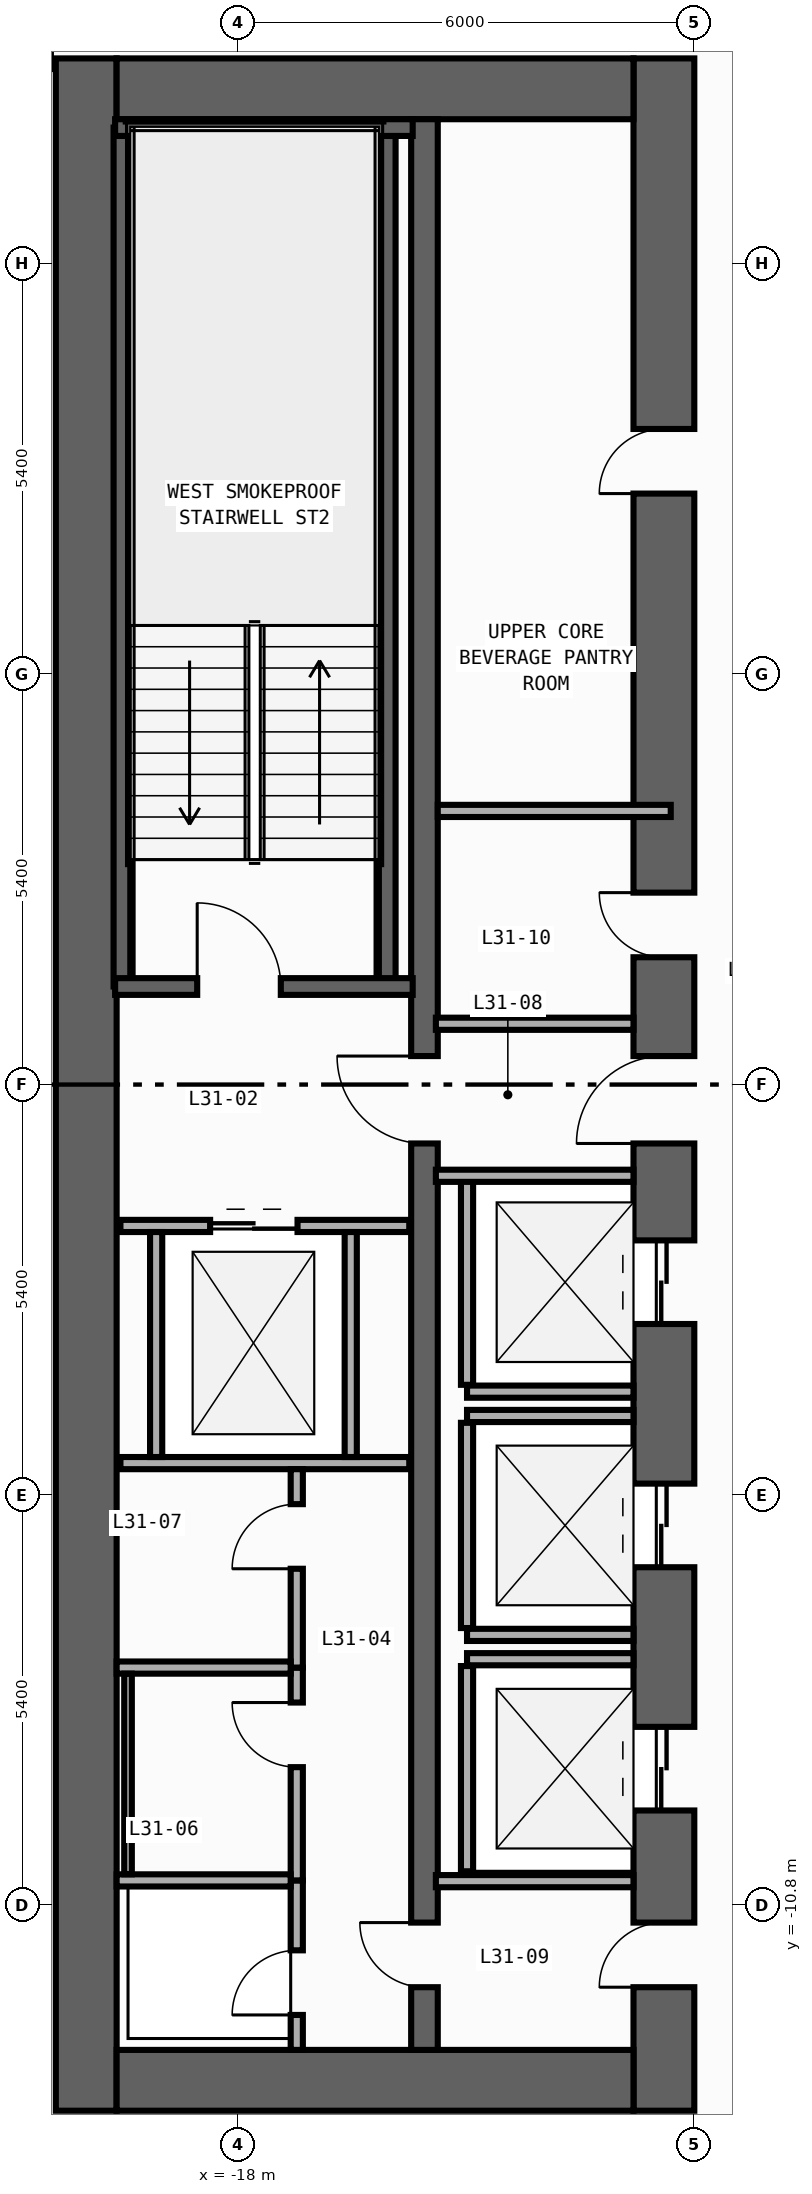
"""IFC4 building model, lengths in metres.
Left out: names, types, materials, properties, quantities, classifications, styles, units other than length and angle.
Written with IfcOpenShell. Run it as: python <this file> out.ifc"""

import sys

from ifc_helpers import new_model, si_unit, direction, frame, frame_2d, origin, place, context, subcontext, project, spatial, rectangle, extrude, element, fill, save


model = new_model("IFC4")
c1 = context("Model", 3, precision=1e-05, world=origin(), true_north=direction((0.0, 1.0)))
c2 = subcontext(c1, "Body", "Model", "MODEL_VIEW")
j1 = project(units=[si_unit("LENGTHUNIT", "METRE"), si_unit("PLANEANGLEUNIT", "RADIAN")], contexts=[c1])
p1 = place(None, origin())
s1 = spatial("IfcSite", under=j1, at=p1, CompositionType="ELEMENT")
p2 = place(p1, origin())
s2 = spatial("IfcBuilding", under=s1, at=p2, CompositionType="ELEMENT")
p3 = place(p2, frame((0.0, 0.0, 135.2)))
s3 = spatial("IfcBuildingStorey", under=s2, at=p3, CompositionType="ELEMENT", Elevation=135.2)
p4 = place(p3, frame((-20.0, -13.5, 0.0), z_axis=(0.0, 0.0, 1.0), x_axis=(0.0, 1.0, 0.0)))
e1 = element("IfcWall", 1, at=p4, inside=s3, PredefinedType="SHEAR", context=c2, shape_type="SweptSolid", body=[
    extrude(rectangle(XDim=27.0, YDim=0.8, at=frame_2d((13.5, 0.0))), origin(), (0.0, 0.0, 1.0), 3.94),
])
p5 = place(p3, frame((-12.4, -13.5, 0.0), z_axis=(0.0, 0.0, 1.0), x_axis=(0.0, 1.0, 0.0)))
e2 = element("IfcWall", 2, at=p5, inside=s3, PredefinedType="SHEAR", context=c2, shape_type="SweptSolid", body=[
    extrude(rectangle(XDim=27.0, YDim=0.8, at=frame_2d((13.5, 0.0))), origin(), (0.0, 0.0, 1.0), 3.94),
])
p6 = place(p5, frame((10.35, 0.0, 0.0)))
e3 = element("IfcOpeningElement", 3, at=p6, cuts=e2, PredefinedType="OPENING", context=c2, shape_type="SweptSolid", body=[
    extrude(rectangle(XDim=1.1, YDim=2.2, at=frame_2d((0.55, 1.1))), frame((0.0, 0.41, 0.0), z_axis=(0.0, -1.0, 0.0), x_axis=(1.0, 0.0, 0.0)), (0.0, 0.0, 1.0), 0.82),
])
p7 = place(p5, frame((7.15, 0.0, 0.0)))
e4 = element("IfcOpeningElement", 4, at=p7, cuts=e2, PredefinedType="OPENING", context=c2, shape_type="SweptSolid", body=[
    extrude(rectangle(XDim=1.1, YDim=2.2, at=frame_2d((0.55, 1.1))), frame((0.0, 0.41, 0.0), z_axis=(0.0, -1.0, 0.0), x_axis=(1.0, 0.0, 0.0)), (0.0, 0.0, 1.0), 0.82),
])
p8 = place(p5, frame((3.95, 0.0, 0.0)))
e5 = element("IfcOpeningElement", 5, at=p8, cuts=e2, PredefinedType="OPENING", context=c2, shape_type="SweptSolid", body=[
    extrude(rectangle(XDim=1.1, YDim=2.2, at=frame_2d((0.55, 1.1))), frame((0.0, 0.41, 0.0), z_axis=(0.0, -1.0, 0.0), x_axis=(1.0, 0.0, 0.0)), (0.0, 0.0, 1.0), 0.82),
])
p9 = place(p5, frame((15.175, 0.0, 0.0)))
e6 = element("IfcOpeningElement", 6, at=p9, cuts=e2, PredefinedType="OPENING", context=c2, shape_type="SweptSolid", body=[
    extrude(rectangle(XDim=0.85, YDim=2.1, at=frame_2d((0.425, 1.05))), frame((0.0, 0.41, 0.0), z_axis=(0.0, -1.0, 0.0), x_axis=(1.0, 0.0, 0.0)), (0.0, 0.0, 1.0), 0.82),
])
p10 = place(p5, frame((21.275, 0.0, 0.0)))
e7 = element("IfcOpeningElement", 7, at=p10, cuts=e2, PredefinedType="OPENING", context=c2, shape_type="SweptSolid", body=[
    extrude(rectangle(XDim=0.85, YDim=2.1, at=frame_2d((0.425, 1.05))), frame((0.0, 0.41, 0.0), z_axis=(0.0, -1.0, 0.0), x_axis=(1.0, 0.0, 0.0)), (0.0, 0.0, 1.0), 0.82),
])
p11 = place(p5, frame((12.725, 0.0, 0.0)))
e8 = element("IfcOpeningElement", 8, at=p11, cuts=e2, PredefinedType="OPENING", context=c2, shape_type="SweptSolid", body=[
    extrude(rectangle(XDim=1.15, YDim=2.2, at=frame_2d((0.575, 1.1))), frame((0.0, 0.41, 0.0), z_axis=(0.0, -1.0, 0.0), x_axis=(1.0, 0.0, 0.0)), (0.0, 0.0, 1.0), 0.82),
])
p12 = place(p5, frame((1.625, 0.0, 0.0)))
e9 = element("IfcOpeningElement", 9, at=p12, cuts=e2, PredefinedType="OPENING", context=c2, shape_type="SweptSolid", body=[
    extrude(rectangle(XDim=0.85, YDim=2.1, at=frame_2d((0.425, 1.05))), frame((0.0, 0.41, 0.0), z_axis=(0.0, -1.0, 0.0), x_axis=(1.0, 0.0, 0.0)), (0.0, 0.0, 1.0), 0.82),
])
for number, where, z_axis, x_axis in (
    (10, (-19.6, -13.1, 0.0), (0.0, 0.0, 1.0), (1.0, 0.0, 0.0)),
    (11, (-19.6, 13.1, 0.0), (0.0, 0.0, 1.0), (1.0, 0.0, 0.0)),
):
    element("IfcWall", number, at=place(p3, frame(where, z_axis=z_axis, x_axis=x_axis)), inside=s3, PredefinedType="SHEAR", context=c2, shape_type="SweptSolid", body=[
        extrude(rectangle(XDim=6.8, YDim=0.8, at=frame_2d((3.4, 0.0))), origin(), (0.0, 0.0, 1.0), 3.94),
    ])
p13 = place(p3, frame((-15.55, -12.7, 0.0), z_axis=(0.0, 0.0, 1.0), x_axis=(0.0, 1.0, 0.0)))
e12 = element("IfcWall", 12, at=p13, inside=s3, PredefinedType="SHEAR", context=c2, shape_type="SweptSolid", body=[
    extrude(rectangle(XDim=25.4, YDim=0.35, at=frame_2d((12.7, 0.0))), origin(), (0.0, 0.0, 1.0), 3.94),
])
p14 = place(p13, frame((11.925, 0.0, 0.0)))
e13 = element("IfcOpeningElement", 13, at=p14, cuts=e12, PredefinedType="OPENING", context=c2, shape_type="SweptSolid", body=[
    extrude(rectangle(XDim=1.15, YDim=2.2, at=frame_2d((0.575, 1.1))), frame((0.0, 0.185, 0.0), z_axis=(0.0, -1.0, 0.0), x_axis=(1.0, 0.0, 0.0)), (0.0, 0.0, 1.0), 0.37),
])
p15 = place(p13, frame((0.825, 0.0, 0.0)))
e14 = element("IfcOpeningElement", 14, at=p15, cuts=e12, PredefinedType="OPENING", context=c2, shape_type="SweptSolid", body=[
    extrude(rectangle(XDim=0.85, YDim=2.1, at=frame_2d((0.425, 1.05))), frame((0.0, 0.185, 0.0), z_axis=(0.0, -1.0, 0.0), x_axis=(1.0, 0.0, 0.0)), (0.0, 0.0, 1.0), 0.37),
])
for number, where, z_axis, x_axis in (
    (15, (-16.04, 1.29, 0.0), (0.0, 0.0, 1.0), (0.0, 1.0, 0.0)),
    (16, (-19.53, 1.29, 0.0), (0.0, 0.0, 1.0), (0.0, 1.0, 0.0)),
):
    element("IfcWall", number, at=place(p3, frame(where, z_axis=z_axis, x_axis=x_axis)), inside=s3, PredefinedType="SHEAR", context=c2, shape_type="SweptSolid", body=[
        extrude(rectangle(XDim=11.3, YDim=0.22, at=frame_2d((5.65, 0.0))), origin(), (0.0, 0.0, 1.0), 3.94),
    ])
p16 = place(p3, frame((-19.62, 12.59, 0.0), z_axis=(0.0, 0.0, 1.0), x_axis=(1.0, 0.0, 0.0)))
e17 = element("IfcWall", 17, at=p16, inside=s3, PredefinedType="SHEAR", context=c2, shape_type="SweptSolid", body=[
    extrude(rectangle(XDim=3.915, YDim=0.22, at=frame_2d((1.958, 0.0))), origin(), (0.0, 0.0, 1.0), 3.94),
])
p17 = place(p3, frame((-19.62, 1.29, 0.0), z_axis=(0.0, 0.0, 1.0), x_axis=(1.0, 0.0, 0.0)))
e18 = element("IfcWall", 18, at=p17, inside=s3, PredefinedType="SHEAR", context=c2, shape_type="SweptSolid", body=[
    extrude(rectangle(XDim=3.915, YDim=0.22, at=frame_2d((1.958, 0.0))), origin(), (0.0, 0.0, 1.0), 3.94),
])
p18 = place(p17, frame((1.08, 0.0, 0.0)))
e19 = element("IfcOpeningElement", 19, at=p18, cuts=e18, PredefinedType="OPENING", context=c2, shape_type="SweptSolid", body=[
    extrude(rectangle(XDim=1.1, YDim=2.2, at=frame_2d((0.55, 1.1))), frame((0.0, 0.12, 0.0), z_axis=(0.0, -1.0, 0.0), x_axis=(1.0, 0.0, 0.0)), (0.0, 0.0, 1.0), 0.24),
])
p19 = place(p3, frame((-14.99, -4.04, 0.0), z_axis=(0.0, 0.0, 1.0), x_axis=(1.0, 0.0, 0.0)))
e20 = element("IfcWall", 20, at=p19, inside=s3, PredefinedType="STANDARD", context=c2, shape_type="SweptSolid", body=[
    extrude(rectangle(XDim=2.19, YDim=0.16, at=frame_2d((1.095, 0.0))), origin(), (0.0, 0.0, 1.0), 3.94),
])
p20 = place(p3, frame((-14.99, -3.95, 0.0), z_axis=(0.0, 0.0, 1.0), x_axis=(0.0, 1.0, 0.0)))
e21 = element("IfcWall", 21, at=p20, inside=s3, PredefinedType="STANDARD", context=c2, shape_type="SweptSolid", body=[
    extrude(rectangle(XDim=2.7, YDim=0.16, at=frame_2d((1.35, 0.0))), origin(), (0.0, 0.0, 1.0), 3.94),
])
for number, where, z_axis, x_axis in (
    (22, (-14.99, -7.24, 0.0), (0.0, 0.0, 1.0), (1.0, 0.0, 0.0)),
    (23, (-14.99, -4.36, 0.0), (0.0, 0.0, 1.0), (1.0, 0.0, 0.0)),
):
    element("IfcWall", number, at=place(p3, frame(where, z_axis=z_axis, x_axis=x_axis)), inside=s3, PredefinedType="STANDARD", context=c2, shape_type="SweptSolid", body=[
        extrude(rectangle(XDim=2.19, YDim=0.16, at=frame_2d((1.095, 0.0))), origin(), (0.0, 0.0, 1.0), 3.94),
    ])
p21 = place(p3, frame((-14.99, -7.15, 0.0), z_axis=(0.0, 0.0, 1.0), x_axis=(0.0, 1.0, 0.0)))
e24 = element("IfcWall", 24, at=p21, inside=s3, PredefinedType="STANDARD", context=c2, shape_type="SweptSolid", body=[
    extrude(rectangle(XDim=2.7, YDim=0.16, at=frame_2d((1.35, 0.0))), origin(), (0.0, 0.0, 1.0), 3.94),
])
p22 = place(p3, frame((-14.99, -7.56, 0.0), z_axis=(0.0, 0.0, 1.0), x_axis=(1.0, 0.0, 0.0)))
e25 = element("IfcWall", 25, at=p22, inside=s3, PredefinedType="STANDARD", context=c2, shape_type="SweptSolid", body=[
    extrude(rectangle(XDim=2.19, YDim=0.16, at=frame_2d((1.095, 0.0))), origin(), (0.0, 0.0, 1.0), 3.94),
])
p23 = place(p3, frame((-14.99, -10.35, 0.0), z_axis=(0.0, 0.0, 1.0), x_axis=(0.0, 1.0, 0.0)))
e26 = element("IfcWall", 26, at=p23, inside=s3, PredefinedType="STANDARD", context=c2, shape_type="SweptSolid", body=[
    extrude(rectangle(XDim=2.7, YDim=0.16, at=frame_2d((1.35, 0.0))), origin(), (0.0, 0.0, 1.0), 3.94),
])
p24 = place(p3, frame((-19.55, -1.86, 0.0), z_axis=(0.0, 0.0, 1.0), x_axis=(1.0, 0.0, 0.0)))
e27 = element("IfcWall", 27, at=p24, inside=s3, PredefinedType="STANDARD", context=c2, shape_type="SweptSolid", body=[
    extrude(rectangle(XDim=3.8, YDim=0.16, at=frame_2d((1.9, 0.0))), origin(), (0.0, 0.0, 1.0), 3.94),
])
p25 = place(p24, frame((1.18, 0.0, 0.0)))
e28 = element("IfcOpeningElement", 28, at=p25, cuts=e27, PredefinedType="OPENING", context=c2, shape_type="SweptSolid", body=[
    extrude(rectangle(XDim=1.15, YDim=2.2, at=frame_2d((0.575, 1.1))), frame((0.0, 0.09, 0.0), z_axis=(0.0, -1.0, 0.0), x_axis=(1.0, 0.0, 0.0)), (0.0, 0.0, 1.0), 0.18),
])
p26 = place(p3, frame((-19.55, -4.98, 0.0), z_axis=(0.0, 0.0, 1.0), x_axis=(1.0, 0.0, 0.0)))
e29 = element("IfcWall", 29, at=p26, inside=s3, PredefinedType="STANDARD", context=c2, shape_type="SweptSolid", body=[
    extrude(rectangle(XDim=3.8, YDim=0.16, at=frame_2d((1.9, 0.0))), origin(), (0.0, 0.0, 1.0), 3.94),
])
for number, where, z_axis, x_axis in (
    (30, (-19.08, -4.9, 0.0), (0.0, 0.0, 1.0), (0.0, 1.0, 0.0)),
    (31, (-16.52, -4.9, 0.0), (0.0, 0.0, 1.0), (0.0, 1.0, 0.0)),
):
    element("IfcWall", number, at=place(p3, frame(where, z_axis=z_axis, x_axis=x_axis)), inside=s3, PredefinedType="STANDARD", context=c2, shape_type="SweptSolid", body=[
        extrude(rectangle(XDim=2.96, YDim=0.16, at=frame_2d((1.48, 0.0))), origin(), (0.0, 0.0, 1.0), 3.94),
    ])
for number, where, z_axis, x_axis in (
    (32, (-15.4, 0.8, 0.0), (0.0, 0.0, 1.0), (1.0, 0.0, 0.0)),
    (33, (-15.4, -1.2, 0.0), (0.0, 0.0, 1.0), (1.0, 0.0, 0.0)),
    (34, (-15.4, -10.48, 0.0), (0.0, 0.0, 1.0), (1.0, 0.0, 0.0)),
):
    element("IfcWall", number, at=place(p3, frame(where, z_axis=z_axis, x_axis=x_axis)), inside=s3, PredefinedType="STANDARD", context=c2, shape_type="SweptSolid", body=[
        extrude(rectangle(XDim=2.6, YDim=0.16, at=frame_2d((1.3, 0.0))), origin(), (0.0, 0.0, 1.0), 3.94),
    ])
p27 = place(p3, frame((-17.23, -12.7, 0.0), z_axis=(0.0, 0.0, 1.0), x_axis=(0.0, 1.0, 0.0)))
e35 = element("IfcWall", 35, at=p27, inside=s3, PredefinedType="PARTITIONING", context=c2, shape_type="SweptSolid", body=[
    extrude(rectangle(XDim=2.23, YDim=0.16, at=frame_2d((1.115, 0.0))), origin(), (0.0, 0.0, 1.0), 3.94),
])
p28 = place(p27, frame((0.46, 0.0, 0.0)))
e36 = element("IfcOpeningElement", 36, at=p28, cuts=e35, PredefinedType="OPENING", context=c2, shape_type="SweptSolid", body=[
    extrude(rectangle(XDim=0.85, YDim=2.1, at=frame_2d((0.425, 1.05))), frame((0.0, 0.09, 0.0), z_axis=(0.0, -1.0, 0.0), x_axis=(1.0, 0.0, 0.0)), (0.0, 0.0, 1.0), 0.18),
])
p29 = place(p3, frame((-17.23, -10.47, 0.0), z_axis=(0.0, 0.0, 1.0), x_axis=(0.0, 1.0, 0.0)))
e37 = element("IfcWall", 37, at=p29, inside=s3, PredefinedType="PARTITIONING", context=c2, shape_type="SweptSolid", body=[
    extrude(rectangle(XDim=2.8, YDim=0.16, at=frame_2d((1.4, 0.0))), origin(), (0.0, 0.0, 1.0), 3.94),
])
p30 = place(p29, frame((1.49, 0.0, 0.0)))
e38 = element("IfcOpeningElement", 38, at=p30, cuts=e37, PredefinedType="OPENING", context=c2, shape_type="SweptSolid", body=[
    extrude(rectangle(XDim=0.85, YDim=2.1, at=frame_2d((0.425, 1.05))), frame((0.0, 0.09, 0.0), z_axis=(0.0, -1.0, 0.0), x_axis=(1.0, 0.0, 0.0)), (0.0, 0.0, 1.0), 0.18),
])
p31 = place(p3, frame((-17.23, -7.67, 0.0), z_axis=(0.0, 0.0, 1.0), x_axis=(0.0, 1.0, 0.0)))
e39 = element("IfcWall", 39, at=p31, inside=s3, PredefinedType="PARTITIONING", context=c2, shape_type="SweptSolid", body=[
    extrude(rectangle(XDim=2.61, YDim=0.16, at=frame_2d((1.305, 0.0))), origin(), (0.0, 0.0, 1.0), 3.94),
])
p32 = place(p31, frame((1.3, 0.0, 0.0)))
e40 = element("IfcOpeningElement", 40, at=p32, cuts=e39, PredefinedType="OPENING", context=c2, shape_type="SweptSolid", body=[
    extrude(rectangle(XDim=0.85, YDim=2.1, at=frame_2d((0.425, 1.05))), frame((0.0, 0.09, 0.0), z_axis=(0.0, -1.0, 0.0), x_axis=(1.0, 0.0, 0.0)), (0.0, 0.0, 1.0), 0.18),
])
for number, where, z_axis, x_axis in (
    (41, (-19.6, -10.47, 0.0), (0.0, 0.0, 1.0), (1.0, 0.0, 0.0)),
    (42, (-19.6, -7.67, 0.0), (0.0, 0.0, 1.0), (1.0, 0.0, 0.0)),
):
    element("IfcWall", number, at=place(p3, frame(where, z_axis=z_axis, x_axis=x_axis)), inside=s3, PredefinedType="PARTITIONING", context=c2, shape_type="SweptSolid", body=[
        extrude(rectangle(XDim=2.29, YDim=0.16, at=frame_2d((1.145, 0.0))), origin(), (0.0, 0.0, 1.0), 3.94),
    ])
p33 = place(p3, frame((-15.375, 3.6, 0.0), z_axis=(0.0, 0.0, 1.0), x_axis=(1.0, 0.0, 0.0)))
e43 = element("IfcWall", 43, at=p33, inside=s3, PredefinedType="PARTITIONING", context=c2, shape_type="SweptSolid", body=[
    extrude(rectangle(XDim=3.065, YDim=0.16, at=frame_2d((1.532, 0.0))), origin(), (0.0, 0.0, 1.0), 3.94),
])
p34 = place(p3, frame((-19.45, -10.39, 0.0), z_axis=(0.0, 0.0, 1.0), x_axis=(0.0, 1.0, 0.0)))
e44 = element("IfcWall", 44, at=p34, inside=s3, PredefinedType="PARTITIONING", context=c2, shape_type="SweptSolid", body=[
    extrude(rectangle(XDim=2.64, YDim=0.1, at=frame_2d((1.32, 0.0))), origin(), (0.0, 0.0, 1.0), 3.94),
])
p35 = place(p18, origin())
e45 = element("IfcDoor", 45, at=p35, inside=s3, OperationType="SINGLE_SWING_LEFT", PredefinedType="DOOR", context=c2, shape_type="SweptSolid", body=[
    extrude(rectangle(XDim=1.1, YDim=2.2, at=frame_2d((0.55, 1.1))), frame((0.0, 0.025, 0.0), z_axis=(0.0, -1.0, 0.0), x_axis=(1.0, 0.0, 0.0)), (0.0, 0.0, 1.0), 0.05),
])
fill(e19, e45)
p36 = place(p6, origin())
e46 = element("IfcDoor", 46, at=p36, inside=s3, OperationType="DOUBLE_DOOR_SLIDING", PredefinedType="DOOR", context=c2, shape_type="SweptSolid", body=[
    extrude(rectangle(XDim=1.1, YDim=2.2, at=frame_2d((0.55, 1.1))), frame((0.0, 0.025, 0.0), z_axis=(0.0, -1.0, 0.0), x_axis=(1.0, 0.0, 0.0)), (0.0, 0.0, 1.0), 0.05),
])
fill(e3, e46)
p37 = place(p7, origin())
e47 = element("IfcDoor", 47, at=p37, inside=s3, OperationType="DOUBLE_DOOR_SLIDING", PredefinedType="DOOR", context=c2, shape_type="SweptSolid", body=[
    extrude(rectangle(XDim=1.1, YDim=2.2, at=frame_2d((0.55, 1.1))), frame((0.0, 0.025, 0.0), z_axis=(0.0, -1.0, 0.0), x_axis=(1.0, 0.0, 0.0)), (0.0, 0.0, 1.0), 0.05),
])
fill(e4, e47)
p38 = place(p8, origin())
e48 = element("IfcDoor", 48, at=p38, inside=s3, OperationType="DOUBLE_DOOR_SLIDING", PredefinedType="DOOR", context=c2, shape_type="SweptSolid", body=[
    extrude(rectangle(XDim=1.1, YDim=2.2, at=frame_2d((0.55, 1.1))), frame((0.0, 0.025, 0.0), z_axis=(0.0, -1.0, 0.0), x_axis=(1.0, 0.0, 0.0)), (0.0, 0.0, 1.0), 0.05),
])
fill(e5, e48)
p39 = place(p9, origin())
e49 = element("IfcDoor", 49, at=p39, inside=s3, OperationType="SINGLE_SWING_RIGHT", PredefinedType="DOOR", context=c2, shape_type="SweptSolid", body=[
    extrude(rectangle(XDim=0.85, YDim=2.1, at=frame_2d((0.425, 1.05))), frame((0.0, 0.025, 0.0), z_axis=(0.0, -1.0, 0.0), x_axis=(1.0, 0.0, 0.0)), (0.0, 0.0, 1.0), 0.05),
])
fill(e6, e49)
p40 = place(p10, origin())
e50 = element("IfcDoor", 50, at=p40, inside=s3, OperationType="SINGLE_SWING_LEFT", PredefinedType="DOOR", context=c2, shape_type="SweptSolid", body=[
    extrude(rectangle(XDim=0.85, YDim=2.1, at=frame_2d((0.425, 1.05))), frame((0.0, 0.025, 0.0), z_axis=(0.0, -1.0, 0.0), x_axis=(1.0, 0.0, 0.0)), (0.0, 0.0, 1.0), 0.05),
])
fill(e7, e50)
p41 = place(p11, origin())
e51 = element("IfcDoor", 51, at=p41, inside=s3, OperationType="SINGLE_SWING_LEFT", PredefinedType="DOOR", context=c2, shape_type="SweptSolid", body=[
    extrude(rectangle(XDim=1.15, YDim=2.2, at=frame_2d((0.575, 1.1))), frame((0.0, 0.025, 0.0), z_axis=(0.0, -1.0, 0.0), x_axis=(1.0, 0.0, 0.0)), (0.0, 0.0, 1.0), 0.05),
])
fill(e8, e51)
p42 = place(p14, origin())
e52 = element("IfcDoor", 52, at=p42, inside=s3, OperationType="SINGLE_SWING_RIGHT", PredefinedType="DOOR", context=c2, shape_type="SweptSolid", body=[
    extrude(rectangle(XDim=1.15, YDim=2.2, at=frame_2d((0.575, 1.1))), frame((0.0, 0.025, 0.0), z_axis=(0.0, -1.0, 0.0), x_axis=(1.0, 0.0, 0.0)), (0.0, 0.0, 1.0), 0.05),
])
fill(e13, e52)
p43 = place(p12, origin())
e53 = element("IfcDoor", 53, at=p43, inside=s3, OperationType="SINGLE_SWING_LEFT", PredefinedType="DOOR", context=c2, shape_type="SweptSolid", body=[
    extrude(rectangle(XDim=0.85, YDim=2.1, at=frame_2d((0.425, 1.05))), frame((0.0, 0.025, 0.0), z_axis=(0.0, -1.0, 0.0), x_axis=(1.0, 0.0, 0.0)), (0.0, 0.0, 1.0), 0.05),
])
fill(e9, e53)
p44 = place(p15, origin())
e54 = element("IfcDoor", 54, at=p44, inside=s3, OperationType="SINGLE_SWING_RIGHT", PredefinedType="DOOR", context=c2, shape_type="SweptSolid", body=[
    extrude(rectangle(XDim=0.85, YDim=2.1, at=frame_2d((0.425, 1.05))), frame((0.0, 0.025, 0.0), z_axis=(0.0, -1.0, 0.0), x_axis=(1.0, 0.0, 0.0)), (0.0, 0.0, 1.0), 0.05),
])
fill(e14, e54)
p45 = place(p25, origin())
e55 = element("IfcDoor", 55, at=p45, inside=s3, OperationType="DOUBLE_DOOR_SLIDING", PredefinedType="DOOR", context=c2, shape_type="SweptSolid", body=[
    extrude(rectangle(XDim=1.15, YDim=2.2, at=frame_2d((0.575, 1.1))), frame((0.0, 0.025, 0.0), z_axis=(0.0, -1.0, 0.0), x_axis=(1.0, 0.0, 0.0)), (0.0, 0.0, 1.0), 0.05),
])
fill(e28, e55)
p46 = place(p28, origin())
e56 = element("IfcDoor", 56, at=p46, inside=s3, OperationType="SINGLE_SWING_LEFT", PredefinedType="DOOR", context=c2, shape_type="SweptSolid", body=[
    extrude(rectangle(XDim=0.85, YDim=2.1, at=frame_2d((0.425, 1.05))), frame((0.0, 0.025, 0.0), z_axis=(0.0, -1.0, 0.0), x_axis=(1.0, 0.0, 0.0)), (0.0, 0.0, 1.0), 0.05),
])
fill(e36, e56)
p47 = place(p30, origin())
e57 = element("IfcDoor", 57, at=p47, inside=s3, OperationType="SINGLE_SWING_RIGHT", PredefinedType="DOOR", context=c2, shape_type="SweptSolid", body=[
    extrude(rectangle(XDim=0.85, YDim=2.1, at=frame_2d((0.425, 1.05))), frame((0.0, 0.025, 0.0), z_axis=(0.0, -1.0, 0.0), x_axis=(1.0, 0.0, 0.0)), (0.0, 0.0, 1.0), 0.05),
])
fill(e38, e57)
p48 = place(p32, origin())
e58 = element("IfcDoor", 58, at=p48, inside=s3, OperationType="SINGLE_SWING_LEFT", PredefinedType="DOOR", context=c2, shape_type="SweptSolid", body=[
    extrude(rectangle(XDim=0.85, YDim=2.1, at=frame_2d((0.425, 1.05))), frame((0.0, 0.025, 0.0), z_axis=(0.0, -1.0, 0.0), x_axis=(1.0, 0.0, 0.0)), (0.0, 0.0, 1.0), 0.05),
])
fill(e40, e58)
save(model, sys.argv[1])
